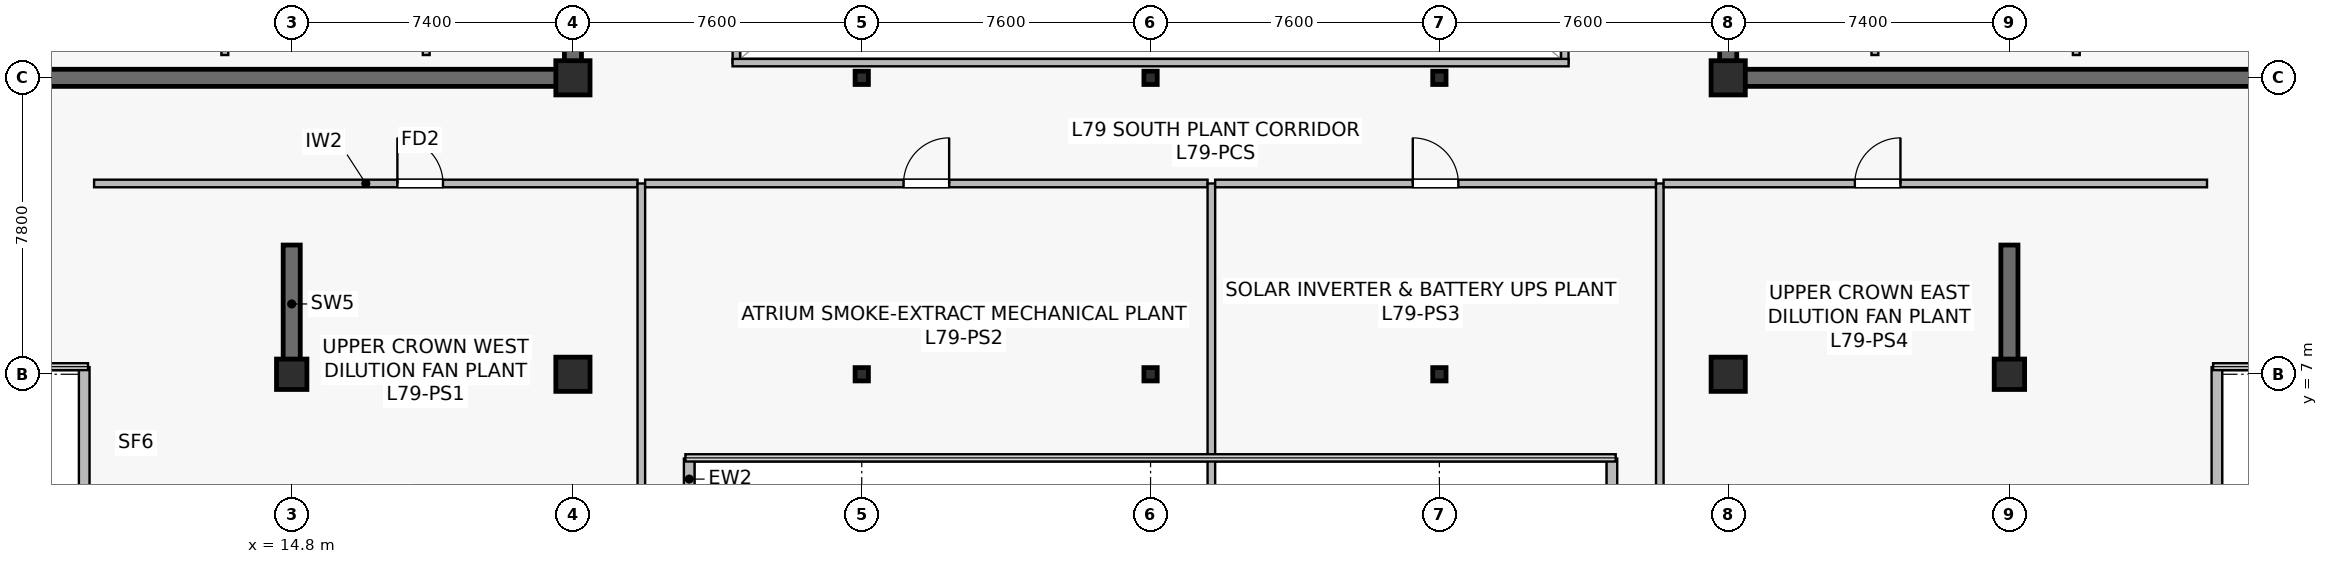
"""IFC4 building model, lengths in metres.
Left out: names, types, materials, properties, quantities, classifications, styles, units other than length and angle.
Written with IfcOpenShell. Run it as: python <this file> out.ifc"""

import sys

from ifc_helpers import new_model, si_unit, direction, frame, frame_2d, origin, origin_2d, place, context, subcontext, project, spatial, rectangle, i_section, extrude, source, transform, mapped, element, fill, save


model = new_model("IFC4")
c1 = context("Model", 3, precision=1e-05, world=origin(), true_north=direction((0.0, 1.0)))
c2 = subcontext(c1, "Body", "Model", "MODEL_VIEW")
j1 = project(units=[si_unit("LENGTHUNIT", "METRE"), si_unit("PLANEANGLEUNIT", "RADIAN")], contexts=[c1])
p1 = place(None, origin())
s1 = spatial("IfcSite", under=j1, at=p1, CompositionType="ELEMENT")
p2 = place(p1, origin())
s2 = spatial("IfcBuilding", under=s1, at=p2, CompositionType="ELEMENT")
p3 = place(p2, frame((0.0, 0.0, 332.4)))
s3 = spatial("IfcBuildingStorey", under=s2, at=p3, CompositionType="ELEMENT", Elevation=332.4)
p4 = place(p3, frame((7.175, 14.8, 0.0), z_axis=(0.0, 0.0, 1.0), x_axis=(1.0, 0.0, 0.0)))
e1 = element("IfcWall", 1, at=p4, inside=s3, PredefinedType="SHEAR", context=c2, shape_type="SweptSolid", body=[
    extrude(rectangle(XDim=15.25, YDim=0.45, at=frame_2d((7.625, 0.0))), origin(), (0.0, 0.0, 1.0), 5.12),
])
p5 = place(p3, frame((22.2, 15.025, 0.0), z_axis=(0.0, 0.0, 1.0), x_axis=(0.0, 1.0, 0.0)))
e2 = element("IfcWall", 2, at=p5, inside=s3, PredefinedType="SHEAR", context=c2, shape_type="SweptSolid", body=[
    extrude(rectangle(XDim=18.55, YDim=0.45, at=frame_2d((9.275, 0.0))), origin(), (0.0, 0.0, 1.0), 5.12),
])
p6 = place(p5, frame((3.525, 0.0, 0.0)))
e3 = element("IfcOpeningElement", 3, at=p6, cuts=e2, PredefinedType="OPENING", context=c2, shape_type="SweptSolid", body=[
    extrude(rectangle(XDim=1.42, YDim=2.2, at=frame_2d((0.71, 1.1))), frame((0.0, 0.235, 0.0), z_axis=(0.0, -1.0, 0.0), x_axis=(1.0, 0.0, 0.0)), (0.0, 0.0, 1.0), 0.47),
])
p7 = place(p3, frame((52.375, 14.8, 0.0), z_axis=(0.0, 0.0, 1.0), x_axis=(1.0, 0.0, 0.0)))
e4 = element("IfcWall", 4, at=p7, inside=s3, PredefinedType="SHEAR", context=c2, shape_type="SweptSolid", body=[
    extrude(rectangle(XDim=15.25, YDim=0.45, at=frame_2d((7.625, 0.0))), origin(), (0.0, 0.0, 1.0), 5.12),
])
p8 = place(p3, frame((52.6, 15.025, 0.0), z_axis=(0.0, 0.0, 1.0), x_axis=(0.0, 1.0, 0.0)))
e5 = element("IfcWall", 5, at=p8, inside=s3, PredefinedType="SHEAR", context=c2, shape_type="SweptSolid", body=[
    extrude(rectangle(XDim=18.55, YDim=0.45, at=frame_2d((9.275, 0.0))), origin(), (0.0, 0.0, 1.0), 5.12),
])
p9 = place(p8, frame((3.525, 0.0, 0.0)))
e6 = element("IfcOpeningElement", 6, at=p9, cuts=e5, PredefinedType="OPENING", context=c2, shape_type="SweptSolid", body=[
    extrude(rectangle(XDim=1.42, YDim=2.2, at=frame_2d((0.71, 1.1))), frame((0.0, 0.235, 0.0), z_axis=(0.0, -1.0, 0.0), x_axis=(1.0, 0.0, 0.0)), (0.0, 0.0, 1.0), 0.47),
])
for number, where, z_axis, x_axis in (
    (7, (14.8, 7.3, 0.0), (0.0, 0.0, 1.0), (0.0, 1.0, 0.0)),
    (8, (60.0, 7.3, 0.0), (0.0, 0.0, 1.0), (0.0, 1.0, 0.0)),
):
    element("IfcWall", number, at=place(p3, frame(where, z_axis=z_axis, x_axis=x_axis)), inside=s3, PredefinedType="SHEAR", context=c2, shape_type="SweptSolid", body=[
        extrude(rectangle(XDim=3.1, YDim=0.45, at=frame_2d((1.55, 0.0))), origin(), (0.0, 0.0, 1.0), 5.12),
    ])
m1 = source(origin(), c2, "Body", "SweptSolid", [
    extrude(rectangle(XDim=0.8, YDim=0.8, at=origin_2d()), origin(), (0.0, 0.0, 1.0), 5.4),
])
p10 = place(p3, frame((14.8, 7.0, 0.0), z_axis=(0.0, 0.0, 1.0), x_axis=(1.0, 0.0, 0.0)))
e9 = element("IfcColumn", 9, at=p10, inside=s3, PredefinedType="COLUMN", context=c2, shape_type="MappedRepresentation", body=[
    mapped(m1, transform((0.0, 0.0, 0.0), scale=1.0)),
])
m2 = source(origin(), c2, "Body", "SweptSolid", [
    extrude(rectangle(XDim=0.9, YDim=0.9, at=origin_2d()), origin(), (0.0, 0.0, 1.0), 5.4),
])
for number, where, z_axis, x_axis in (
    (10, (22.2, 7.0, 0.0), (0.0, 0.0, 1.0), (1.0, 0.0, 0.0)),
    (11, (22.2, 14.8, 0.0), (0.0, 0.0, 1.0), (1.0, 0.0, 0.0)),
    (12, (52.6, 7.0, 0.0), (0.0, 0.0, 1.0), (1.0, 0.0, 0.0)),
):
    element("IfcColumn", number, at=place(p3, frame(where, z_axis=z_axis, x_axis=x_axis)), inside=s3, PredefinedType="COLUMN", context=c2, shape_type="MappedRepresentation", body=[
        mapped(m2, transform((0.0, 0.0, 0.0), scale=1.0)),
    ])
p11 = place(p3, frame((60.0, 7.0, 0.0), z_axis=(0.0, 0.0, 1.0), x_axis=(1.0, 0.0, 0.0)))
e13 = element("IfcColumn", 13, at=p11, inside=s3, PredefinedType="COLUMN", context=c2, shape_type="MappedRepresentation", body=[
    mapped(m1, transform((0.0, 0.0, 0.0), scale=1.0)),
])
p12 = place(p3, frame((52.6, 14.8, 0.0), z_axis=(0.0, 0.0, 1.0), x_axis=(1.0, 0.0, 0.0)))
e14 = element("IfcColumn", 14, at=p12, inside=s3, PredefinedType="COLUMN", context=c2, shape_type="MappedRepresentation", body=[
    mapped(m2, transform((0.0, 0.0, 0.0), scale=1.0)),
])
m3 = source(origin(), c2, "Body", "SweptSolid", [
    extrude(i_section(OverallWidth=0.35, OverallDepth=0.35, WebThickness=0.012, FlangeThickness=0.019, at=origin_2d()), origin(), (0.0, 0.0, 1.0), 5.4),
])
for number, where, z_axis, x_axis in (
    (15, (29.8, 7.0, 0.0), (0.0, 0.0, 1.0), (1.0, 0.0, 0.0)),
    (16, (29.8, 14.8, 0.0), (0.0, 0.0, 1.0), (1.0, 0.0, 0.0)),
    (17, (37.4, 7.0, 0.0), (0.0, 0.0, 1.0), (1.0, 0.0, 0.0)),
    (18, (37.4, 14.8, 0.0), (0.0, 0.0, 1.0), (1.0, 0.0, 0.0)),
    (19, (45.0, 7.0, 0.0), (0.0, 0.0, 1.0), (1.0, 0.0, 0.0)),
    (20, (45.0, 14.8, 0.0), (0.0, 0.0, 1.0), (1.0, 0.0, 0.0)),
):
    element("IfcColumn", number, at=place(p3, frame(where, z_axis=z_axis, x_axis=x_axis)), inside=s3, PredefinedType="COLUMN", context=c2, shape_type="MappedRepresentation", body=[
        mapped(m3, transform((0.0, 0.0, 0.0), scale=1.0)),
    ])
for number, where, z_axis, x_axis in (
    (21, (25.26, 3.7, 0.0), (0.0, 0.0, 1.0), (0.0, 1.0, 0.0)),
    (22, (49.54, 4.783, 0.0), (0.0, 0.0, 1.0), (0.0, -1.0, 0.0)),
):
    element("IfcWall", number, at=place(p3, frame(where, z_axis=z_axis, x_axis=x_axis)), inside=s3, PredefinedType="STANDARD", context=c2, shape_type="SweptSolid", body=[
        extrude(rectangle(XDim=1.083, YDim=0.28, at=frame_2d((0.542, 0.0))), origin(), (0.0, 0.0, 1.0), 5.12),
    ])
for number, where, z_axis, x_axis in (
    (23, (65.46, 3.7, 0.0), (0.0, 0.0, 1.0), (0.0, 1.0, 0.0)),
    (24, (9.34, 7.188, 0.0), (0.0, 0.0, 1.0), (0.0, -1.0, 0.0)),
):
    element("IfcWall", number, at=place(p3, frame(where, z_axis=z_axis, x_axis=x_axis)), inside=s3, PredefinedType="STANDARD", context=c2, shape_type="SweptSolid", body=[
        extrude(rectangle(XDim=3.488, YDim=0.28, at=frame_2d((1.744, 0.0))), origin(), (0.0, 0.0, 1.0), 5.12),
    ])
for number, where, z_axis, x_axis in (
    (25, (13.04, 15.4, 0.0), (0.0, 0.0, 1.0), (0.0, 1.0, 0.0)),
    (26, (18.34, 15.4, 0.0), (0.0, 0.0, 1.0), (0.0, 1.0, 0.0)),
    (27, (61.76, 15.4, 0.0), (0.0, 0.0, 1.0), (0.0, 1.0, 0.0)),
    (28, (56.46, 15.4, 0.0), (0.0, 0.0, 1.0), (0.0, 1.0, 0.0)),
):
    element("IfcWall", number, at=place(p3, frame(where, z_axis=z_axis, x_axis=x_axis)), inside=s3, PredefinedType="SOLIDWALL", context=c2, shape_type="SweptSolid", body=[
        extrude(rectangle(XDim=2.4, YDim=0.18, at=frame_2d((1.2, 0.0))), origin(), (0.0, 0.0, 1.0), 5.12),
    ])
p13 = place(p3, frame((26.5, 15.2, 0.0), z_axis=(0.0, 0.0, 1.0), x_axis=(0.0, 1.0, 0.0)))
e29 = element("IfcWall", 29, at=p13, inside=s3, PredefinedType="SOLIDWALL", context=c2, shape_type="SweptSolid", body=[
    extrude(rectangle(XDim=18.2, YDim=0.195, at=frame_2d((9.1, 0.0))), origin(), (0.0, 0.0, 1.0), 5.12),
])
p14 = place(p13, frame((1.8, 0.0, 0.9)))
e30 = element("IfcOpeningElement", 30, at=p14, cuts=e29, PredefinedType="OPENING", context=c2, shape_type="SweptSolid", body=[
    extrude(rectangle(XDim=1.2, YDim=1.35, at=frame_2d((0.6, 0.675))), frame((0.0, 0.107, 0.0), z_axis=(0.0, -1.0, 0.0), x_axis=(1.0, 0.0, 0.0)), (0.0, 0.0, 1.0), 0.215),
])
p15 = place(p13, frame((13.2, 0.0, 0.9)))
e31 = element("IfcOpeningElement", 31, at=p15, cuts=e29, PredefinedType="OPENING", context=c2, shape_type="SweptSolid", body=[
    extrude(rectangle(XDim=1.2, YDim=1.35, at=frame_2d((0.6, 0.675))), frame((0.0, 0.107, 0.0), z_axis=(0.0, -1.0, 0.0), x_axis=(1.0, 0.0, 0.0)), (0.0, 0.0, 1.0), 0.215),
])
p16 = place(p3, frame((48.3, 15.2, 0.0), z_axis=(0.0, 0.0, 1.0), x_axis=(0.0, 1.0, 0.0)))
e32 = element("IfcWall", 32, at=p16, inside=s3, PredefinedType="SOLIDWALL", context=c2, shape_type="SweptSolid", body=[
    extrude(rectangle(XDim=18.2, YDim=0.195, at=frame_2d((9.1, 0.0))), origin(), (0.0, 0.0, 1.0), 5.12),
])
p17 = place(p16, frame((1.8, 0.0, 0.9)))
e33 = element("IfcOpeningElement", 33, at=p17, cuts=e32, PredefinedType="OPENING", context=c2, shape_type="SweptSolid", body=[
    extrude(rectangle(XDim=1.2, YDim=1.35, at=frame_2d((0.6, 0.675))), frame((0.0, 0.107, 0.0), z_axis=(0.0, -1.0, 0.0), x_axis=(1.0, 0.0, 0.0)), (0.0, 0.0, 1.0), 0.215),
])
p18 = place(p16, frame((13.2, 0.0, 0.9)))
e34 = element("IfcOpeningElement", 34, at=p18, cuts=e32, PredefinedType="OPENING", context=c2, shape_type="SweptSolid", body=[
    extrude(rectangle(XDim=1.2, YDim=1.35, at=frame_2d((0.6, 0.675))), frame((0.0, 0.107, 0.0), z_axis=(0.0, -1.0, 0.0), x_axis=(1.0, 0.0, 0.0)), (0.0, 0.0, 1.0), 0.215),
])
p19 = place(p3, frame((26.4, 15.2, 0.0), z_axis=(0.0, 0.0, 1.0), x_axis=(1.0, 0.0, 0.0)))
e35 = element("IfcWall", 35, at=p19, inside=s3, PredefinedType="SOLIDWALL", context=c2, shape_type="SweptSolid", body=[
    extrude(rectangle(XDim=22.0, YDim=0.195, at=frame_2d((11.0, 0.0))), origin(), (0.0, 0.0, 1.0), 5.12),
])
p20 = place(p3, frame((9.6, 12.02, 0.0), z_axis=(0.0, 0.0, 1.0), x_axis=(1.0, 0.0, 0.0)))
e36 = element("IfcWall", 36, at=p20, inside=s3, PredefinedType="SOLIDWALL", context=c2, shape_type="SweptSolid", body=[
    extrude(rectangle(XDim=14.3, YDim=0.2, at=frame_2d((7.15, 0.0))), origin(), (0.0, 0.0, 1.0), 4.355),
])
p21 = place(p20, frame((7.981, 0.0, 0.0)))
e37 = element("IfcOpeningElement", 37, at=p21, cuts=e36, PredefinedType="OPENING", context=c2, shape_type="SweptSolid", body=[
    extrude(rectangle(XDim=1.2, YDim=2.16, at=frame_2d((0.6, 1.08))), frame((0.0, 0.11, 0.0), z_axis=(0.0, -1.0, 0.0), x_axis=(1.0, 0.0, 0.0)), (0.0, 0.0, 1.0), 0.22),
])
p22 = place(p3, frame((24.0, 3.81, 0.0), z_axis=(0.0, 0.0, 1.0), x_axis=(0.0, 1.0, 0.0)))
e38 = element("IfcWall", 38, at=p22, inside=s3, PredefinedType="SOLIDWALL", context=c2, shape_type="SweptSolid", body=[
    extrude(rectangle(XDim=8.21, YDim=0.2, at=frame_2d((4.105, 0.0))), origin(), (0.0, 0.0, 1.0), 4.455),
])
p23 = place(p3, frame((24.1, 12.02, 0.0), z_axis=(0.0, 0.0, 1.0), x_axis=(1.0, 0.0, 0.0)))
e39 = element("IfcWall", 39, at=p23, inside=s3, PredefinedType="SOLIDWALL", context=c2, shape_type="SweptSolid", body=[
    extrude(rectangle(XDim=14.8, YDim=0.2, at=frame_2d((7.4, 0.0))), origin(), (0.0, 0.0, 1.0), 4.355),
])
p24 = place(p23, frame((6.8, 0.0, 0.0)))
e40 = element("IfcOpeningElement", 40, at=p24, cuts=e39, PredefinedType="OPENING", context=c2, shape_type="SweptSolid", body=[
    extrude(rectangle(XDim=1.2, YDim=2.16, at=frame_2d((0.6, 1.08))), frame((0.0, 0.11, 0.0), z_axis=(0.0, -1.0, 0.0), x_axis=(1.0, 0.0, 0.0)), (0.0, 0.0, 1.0), 0.22),
])
p25 = place(p3, frame((39.0, 3.81, 0.0), z_axis=(0.0, 0.0, 1.0), x_axis=(0.0, 1.0, 0.0)))
e41 = element("IfcWall", 41, at=p25, inside=s3, PredefinedType="SOLIDWALL", context=c2, shape_type="SweptSolid", body=[
    extrude(rectangle(XDim=8.21, YDim=0.2, at=frame_2d((4.105, 0.0))), origin(), (0.0, 0.0, 1.0), 4.455),
])
p26 = place(p3, frame((39.1, 12.02, 0.0), z_axis=(0.0, 0.0, 1.0), x_axis=(1.0, 0.0, 0.0)))
e42 = element("IfcWall", 42, at=p26, inside=s3, PredefinedType="SOLIDWALL", context=c2, shape_type="SweptSolid", body=[
    extrude(rectangle(XDim=11.6, YDim=0.2, at=frame_2d((5.8, 0.0))), origin(), (0.0, 0.0, 1.0), 4.355),
])
p27 = place(p26, frame((5.2, 0.0, 0.0)))
e43 = element("IfcOpeningElement", 43, at=p27, cuts=e42, PredefinedType="OPENING", context=c2, shape_type="SweptSolid", body=[
    extrude(rectangle(XDim=1.2, YDim=2.16, at=frame_2d((0.6, 1.08))), frame((0.0, 0.11, 0.0), z_axis=(0.0, -1.0, 0.0), x_axis=(1.0, 0.0, 0.0)), (0.0, 0.0, 1.0), 0.22),
])
p28 = place(p3, frame((50.8, 3.81, 0.0), z_axis=(0.0, 0.0, 1.0), x_axis=(0.0, 1.0, 0.0)))
e44 = element("IfcWall", 44, at=p28, inside=s3, PredefinedType="SOLIDWALL", context=c2, shape_type="SweptSolid", body=[
    extrude(rectangle(XDim=8.21, YDim=0.2, at=frame_2d((4.105, 0.0))), origin(), (0.0, 0.0, 1.0), 4.455),
])
p29 = place(p3, frame((50.9, 12.02, 0.0), z_axis=(0.0, 0.0, 1.0), x_axis=(1.0, 0.0, 0.0)))
e45 = element("IfcWall", 45, at=p29, inside=s3, PredefinedType="SOLIDWALL", context=c2, shape_type="SweptSolid", body=[
    extrude(rectangle(XDim=14.3, YDim=0.2, at=frame_2d((7.15, 0.0))), origin(), (0.0, 0.0, 1.0), 4.355),
])
p30 = place(p29, frame((5.032, 0.0, 0.0)))
e46 = element("IfcOpeningElement", 46, at=p30, cuts=e45, PredefinedType="OPENING", context=c2, shape_type="SweptSolid", body=[
    extrude(rectangle(XDim=1.2, YDim=2.16, at=frame_2d((0.6, 1.08))), frame((0.0, 0.11, 0.0), z_axis=(0.0, -1.0, 0.0), x_axis=(1.0, 0.0, 0.0)), (0.0, 0.0, 1.0), 0.22),
])
m4 = source(origin(), c2, "Body", "SweptSolid", [
    extrude(rectangle(XDim=1.2, YDim=2.16, at=frame_2d((0.6, 1.08))), frame((0.0, 0.025, 0.0), z_axis=(0.0, -1.0, 0.0), x_axis=(1.0, 0.0, 0.0)), (0.0, 0.0, 1.0), 0.05),
])
p31 = place(p21, origin())
e47 = element("IfcDoor", 47, at=p31, inside=s3, OperationType="SINGLE_SWING_LEFT", PredefinedType="DOOR", context=c2, shape_type="MappedRepresentation", body=[
    mapped(m4, transform((0.0, 0.0, 0.0), scale=1.0)),
])
fill(e37, e47)
p32 = place(p24, origin())
e48 = element("IfcDoor", 48, at=p32, inside=s3, OperationType="SINGLE_SWING_RIGHT", PredefinedType="DOOR", context=c2, shape_type="MappedRepresentation", body=[
    mapped(m4, transform((0.0, 0.0, 0.0), scale=1.0)),
])
fill(e40, e48)
p33 = place(p27, origin())
e49 = element("IfcDoor", 49, at=p33, inside=s3, OperationType="SINGLE_SWING_LEFT", PredefinedType="DOOR", context=c2, shape_type="MappedRepresentation", body=[
    mapped(m4, transform((0.0, 0.0, 0.0), scale=1.0)),
])
fill(e43, e49)
p34 = place(p30, origin())
e50 = element("IfcDoor", 50, at=p34, inside=s3, OperationType="SINGLE_SWING_RIGHT", PredefinedType="DOOR", context=c2, shape_type="MappedRepresentation", body=[
    mapped(m4, transform((0.0, 0.0, 0.0), scale=1.0)),
])
fill(e46, e50)
save(model, sys.argv[1])
